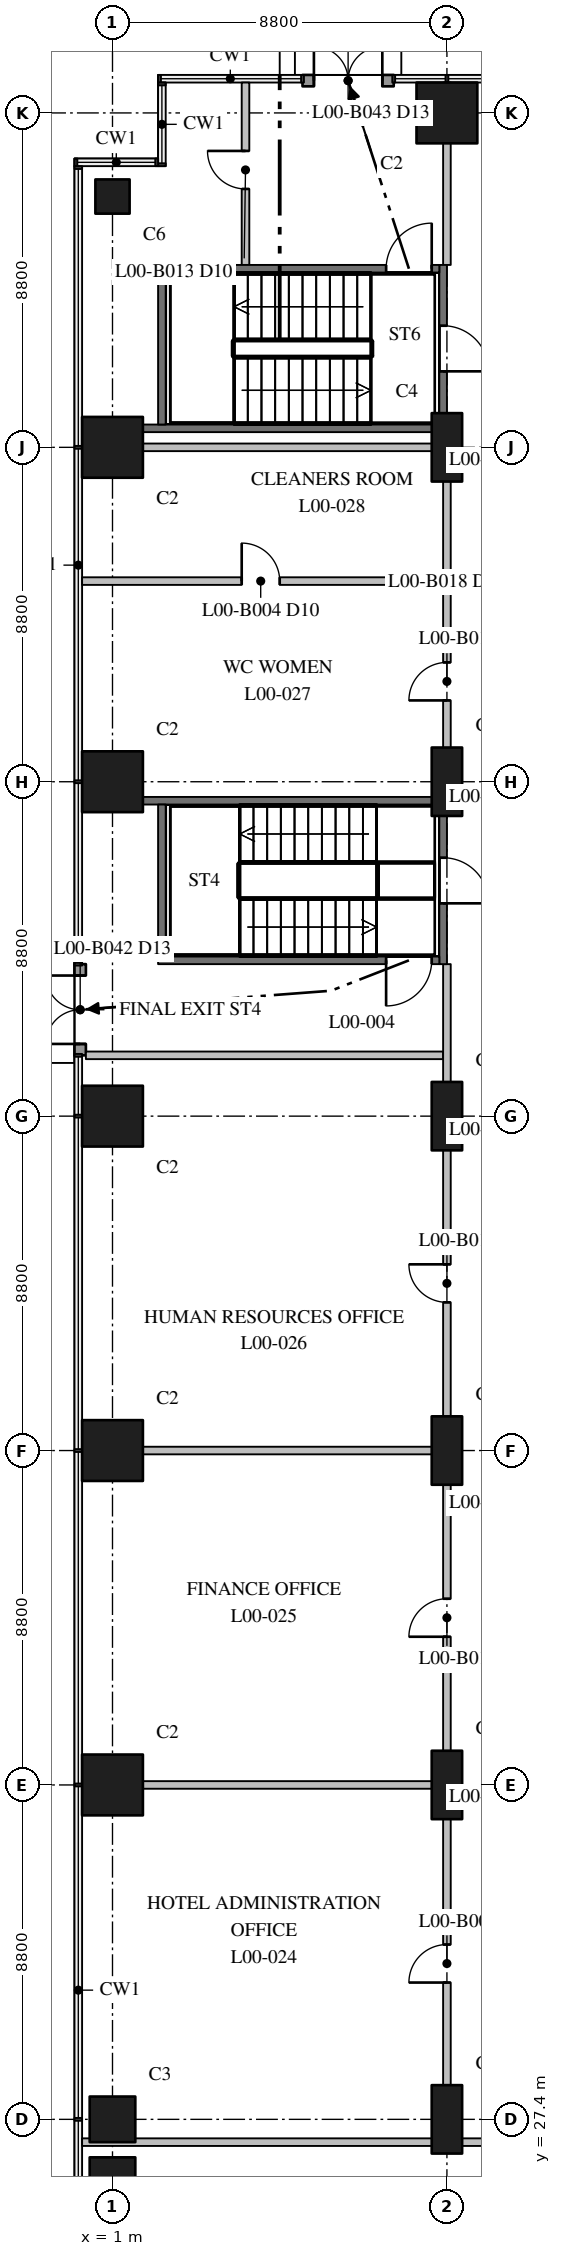
"""IFC4 building model, lengths in metres.
Left out: names, types, materials, properties, quantities, classifications, styles, units other than length and angle.
Written with IfcOpenShell. Run it as: python <this file> out.ifc"""

import sys

from ifc_helpers import new_model, si_unit, direction, frame, frame_2d, origin, origin_2d, place, context, subcontext, project, spatial, rectangle, extrude, element, fill, save


model = new_model("IFC4")
c1 = context("Model", 3, precision=1e-05, world=origin(), true_north=direction((0.0, 1.0)))
c2 = subcontext(c1, "Body", "Model", "MODEL_VIEW")
j1 = project(units=[si_unit("LENGTHUNIT", "METRE"), si_unit("PLANEANGLEUNIT", "RADIAN")], contexts=[c1])
p1 = place(None, origin())
s1 = spatial("IfcSite", under=j1, at=p1, CompositionType="ELEMENT")
p2 = place(p1, origin())
s2 = spatial("IfcBuilding", under=s1, at=p2, CompositionType="ELEMENT")
p3 = place(p2, origin())
s3 = spatial("IfcBuildingStorey", under=s2, at=p3, CompositionType="ELEMENT", Elevation=0.0)
for number, where, z_axis, x_axis in (
    (1, (1.0, 25.8, 0.0), (0.0, 0.0, 1.0), (1.0, 0.0, 0.0)),
    (2, (1.0, 27.4, 0.0), (0.0, 0.0, 1.0), (1.0, 0.0, 0.0)),
):
    element("IfcColumn", number, at=place(p3, frame(where, z_axis=z_axis, x_axis=x_axis)), inside=s3, PredefinedType="COLUMN", context=c2, shape_type="SweptSolid", body=[
        extrude(rectangle(XDim=1.2, YDim=1.2, at=origin_2d()), origin(), (0.0, 0.0, 1.0), 7.5),
    ])
for number, where, z_axis, x_axis in (
    (3, (1.0, 36.2, 0.0), (0.0, 0.0, 1.0), (1.0, 0.0, 0.0)),
    (4, (1.0, 45.0, 0.0), (0.0, 0.0, 1.0), (1.0, 0.0, 0.0)),
    (5, (1.0, 53.8, 0.0), (0.0, 0.0, 1.0), (1.0, 0.0, 0.0)),
    (6, (1.0, 62.6, 0.0), (0.0, 0.0, 1.0), (1.0, 0.0, 0.0)),
    (7, (1.0, 71.4, 0.0), (0.0, 0.0, 1.0), (1.0, 0.0, 0.0)),
):
    element("IfcColumn", number, at=place(p3, frame(where, z_axis=z_axis, x_axis=x_axis)), inside=s3, PredefinedType="COLUMN", context=c2, shape_type="SweptSolid", body=[
        extrude(rectangle(XDim=1.6, YDim=1.6, at=origin_2d()), origin(), (0.0, 0.0, 1.0), 7.5),
    ])
p4 = place(p3, frame((1.0, 78.0, 0.0), z_axis=(0.0, 0.0, 1.0), x_axis=(1.0, 0.0, 0.0)))
e8 = element("IfcColumn", 8, at=p4, inside=s3, PredefinedType="COLUMN", context=c2, shape_type="SweptSolid", body=[
    extrude(rectangle(XDim=0.9, YDim=0.9, at=origin_2d()), origin(), (0.0, 0.0, 1.0), 7.5),
])
for number, where, z_axis, x_axis in (
    (9, (9.8, 27.4, 0.0), (0.0, 0.0, 1.0), (0.0, 1.0, 0.0)),
    (10, (9.8, 36.2, 0.0), (0.0, 0.0, 1.0), (0.0, 1.0, 0.0)),
    (11, (9.8, 45.0, 0.0), (0.0, 0.0, 1.0), (0.0, 1.0, 0.0)),
    (12, (9.8, 53.8, 0.0), (0.0, 0.0, 1.0), (0.0, 1.0, 0.0)),
    (13, (9.8, 62.6, 0.0), (0.0, 0.0, 1.0), (0.0, 1.0, 0.0)),
    (14, (9.8, 71.4, 0.0), (0.0, 0.0, 1.0), (0.0, 1.0, 0.0)),
):
    element("IfcColumn", number, at=place(p3, frame(where, z_axis=z_axis, x_axis=x_axis)), inside=s3, PredefinedType="COLUMN", context=c2, shape_type="SweptSolid", body=[
        extrude(rectangle(XDim=1.8, YDim=0.8, at=origin_2d()), origin(), (0.0, 0.0, 1.0), 7.5),
    ])
p5 = place(p3, frame((9.8, 80.2, 0.0), z_axis=(0.0, 0.0, 1.0), x_axis=(1.0, 0.0, 0.0)))
e15 = element("IfcColumn", 15, at=p5, inside=s3, PredefinedType="COLUMN", context=c2, shape_type="SweptSolid", body=[
    extrude(rectangle(XDim=1.6, YDim=1.6, at=origin_2d()), origin(), (0.0, 0.0, 1.0), 7.5),
])
p6 = place(p3, frame((9.7, 57.8, 0.0), z_axis=(0.0, 0.0, 1.0), x_axis=(0.0, 1.0, 0.0)))
e16 = element("IfcWall", 16, at=p6, inside=s3, PredefinedType="SHEAR", context=c2, shape_type="SweptSolid", body=[
    extrude(rectangle(XDim=4.4, YDim=0.2, at=frame_2d((2.2, 0.0))), origin(), (0.0, 0.0, 1.0), 7.1),
])
p7 = place(p6, frame((1.6, 0.0, 0.0)))
e17 = element("IfcOpeningElement", 17, at=p7, cuts=e16, PredefinedType="OPENING", context=c2, shape_type="SweptSolid", body=[
    extrude(rectangle(XDim=1.2, YDim=2.1, at=frame_2d((0.6, 1.05))), frame((0.0, 0.11, 0.0), z_axis=(0.0, -1.0, 0.0), x_axis=(1.0, 0.0, 0.0)), (0.0, 0.0, 1.0), 0.22),
])
p8 = place(p3, frame((1.8, 62.1, 0.0), z_axis=(0.0, 0.0, 1.0), x_axis=(1.0, 0.0, 0.0)))
e18 = element("IfcWall", 18, at=p8, inside=s3, PredefinedType="SHEAR", context=c2, shape_type="SweptSolid", body=[
    extrude(rectangle(XDim=7.8, YDim=0.2, at=frame_2d((3.9, 0.0))), origin(), (0.0, 0.0, 1.0), 7.1),
])
p9 = place(p3, frame((2.2, 57.9, 0.0), z_axis=(0.0, 0.0, 1.0), x_axis=(1.0, 0.0, 0.0)))
e19 = element("IfcWall", 19, at=p9, inside=s3, PredefinedType="SHEAR", context=c2, shape_type="SweptSolid", body=[
    extrude(rectangle(XDim=7.4, YDim=0.2, at=frame_2d((3.7, 0.0))), origin(), (0.0, 0.0, 1.0), 7.1),
])
p10 = place(p9, frame((6.0, 0.0, 0.0)))
e20 = element("IfcOpeningElement", 20, at=p10, cuts=e19, PredefinedType="OPENING", context=c2, shape_type="SweptSolid", body=[
    extrude(rectangle(XDim=1.2, YDim=2.1, at=frame_2d((0.6, 1.05))), frame((0.0, 0.11, 0.0), z_axis=(0.0, -1.0, 0.0), x_axis=(1.0, 0.0, 0.0)), (0.0, 0.0, 1.0), 0.22),
])
p11 = place(p3, frame((2.3, 58.0, 0.0), z_axis=(0.0, 0.0, 1.0), x_axis=(0.0, 1.0, 0.0)))
e21 = element("IfcWall", 21, at=p11, inside=s3, PredefinedType="SHEAR", context=c2, shape_type="SweptSolid", body=[
    extrude(rectangle(XDim=4.0, YDim=0.2, at=frame_2d((2.0, 0.0))), origin(), (0.0, 0.0, 1.0), 7.1),
])
p12 = place(p3, frame((9.7, 71.8, 0.0), z_axis=(0.0, 0.0, 1.0), x_axis=(0.0, 1.0, 0.0)))
e22 = element("IfcWall", 22, at=p12, inside=s3, PredefinedType="SHEAR", context=c2, shape_type="SweptSolid", body=[
    extrude(rectangle(XDim=4.4, YDim=0.2, at=frame_2d((2.2, 0.0))), origin(), (0.0, 0.0, 1.0), 7.1),
])
p13 = place(p12, frame((1.6, 0.0, 0.0)))
e23 = element("IfcOpeningElement", 23, at=p13, cuts=e22, PredefinedType="OPENING", context=c2, shape_type="SweptSolid", body=[
    extrude(rectangle(XDim=1.2, YDim=2.1, at=frame_2d((0.6, 1.05))), frame((0.0, 0.11, 0.0), z_axis=(0.0, -1.0, 0.0), x_axis=(1.0, 0.0, 0.0)), (0.0, 0.0, 1.0), 0.22),
])
p14 = place(p3, frame((2.2, 76.1, 0.0), z_axis=(0.0, 0.0, 1.0), x_axis=(1.0, 0.0, 0.0)))
e24 = element("IfcWall", 24, at=p14, inside=s3, PredefinedType="SHEAR", context=c2, shape_type="SweptSolid", body=[
    extrude(rectangle(XDim=7.4, YDim=0.2, at=frame_2d((3.7, 0.0))), origin(), (0.0, 0.0, 1.0), 7.1),
])
p15 = place(p14, frame((6.0, 0.0, 0.0)))
e25 = element("IfcOpeningElement", 25, at=p15, cuts=e24, PredefinedType="OPENING", context=c2, shape_type="SweptSolid", body=[
    extrude(rectangle(XDim=1.2, YDim=2.1, at=frame_2d((0.6, 1.05))), frame((0.0, 0.11, 0.0), z_axis=(0.0, -1.0, 0.0), x_axis=(1.0, 0.0, 0.0)), (0.0, 0.0, 1.0), 0.22),
])
p16 = place(p3, frame((1.8, 71.9, 0.0), z_axis=(0.0, 0.0, 1.0), x_axis=(1.0, 0.0, 0.0)))
e26 = element("IfcWall", 26, at=p16, inside=s3, PredefinedType="SHEAR", context=c2, shape_type="SweptSolid", body=[
    extrude(rectangle(XDim=7.8, YDim=0.2, at=frame_2d((3.9, 0.0))), origin(), (0.0, 0.0, 1.0), 7.1),
])
p17 = place(p3, frame((2.3, 72.0, 0.0), z_axis=(0.0, 0.0, 1.0), x_axis=(0.0, 1.0, 0.0)))
e27 = element("IfcWall", 27, at=p17, inside=s3, PredefinedType="SHEAR", context=c2, shape_type="SweptSolid", body=[
    extrude(rectangle(XDim=4.0, YDim=0.2, at=frame_2d((2.0, 0.0))), origin(), (0.0, 0.0, 1.0), 7.1),
])
p18 = place(p3, frame((0.3, 55.4, 0.0), z_axis=(0.0, 0.0, 1.0), x_axis=(1.0, 0.0, 0.0)))
e28 = element("IfcWall", 28, at=p18, inside=s3, PredefinedType="PARTITIONING", context=c2, shape_type="SweptSolid", body=[
    extrude(rectangle(XDim=9.4, YDim=0.2, at=frame_2d((4.7, 0.0))), origin(), (0.0, 0.0, 1.0), 7.1),
])
p19 = place(p3, frame((0.2, 26.8, 0.0), z_axis=(0.0, 0.0, 1.0), x_axis=(1.0, 0.0, 0.0)))
e29 = element("IfcWall", 29, at=p19, inside=s3, PredefinedType="PARTITIONING", context=c2, shape_type="SweptSolid", body=[
    extrude(rectangle(XDim=9.6, YDim=0.2, at=frame_2d((4.8, 0.0))), origin(), (0.0, 0.0, 1.0), 7.1),
])
p20 = place(p3, frame((9.8, 26.8, 0.0), z_axis=(0.0, 0.0, 1.0), x_axis=(1.0, 0.0, 0.0)))
e30 = element("IfcWall", 30, at=p20, inside=s3, PredefinedType="PARTITIONING", context=c2, shape_type="SweptSolid", body=[
    extrude(rectangle(XDim=2.5, YDim=0.2, at=frame_2d((1.25, 0.0))), origin(), (0.0, 0.0, 1.0), 7.1),
])
for number, where, z_axis, x_axis in (
    (31, (0.2, 36.2, 0.0), (0.0, 0.0, 1.0), (1.0, 0.0, 0.0)),
    (32, (0.2, 45.0, 0.0), (0.0, 0.0, 1.0), (1.0, 0.0, 0.0)),
):
    element("IfcWall", number, at=place(p3, frame(where, z_axis=z_axis, x_axis=x_axis)), inside=s3, PredefinedType="PARTITIONING", context=c2, shape_type="SweptSolid", body=[
        extrude(rectangle(XDim=9.5, YDim=0.2, at=frame_2d((4.75, 0.0))), origin(), (0.0, 0.0, 1.0), 7.1),
    ])
p21 = place(p3, frame((0.2, 67.88, 0.0), z_axis=(0.0, 0.0, 1.0), x_axis=(1.0, 0.0, 0.0)))
e33 = element("IfcWall", 33, at=p21, inside=s3, PredefinedType="PARTITIONING", context=c2, shape_type="SweptSolid", body=[
    extrude(rectangle(XDim=9.5, YDim=0.2, at=frame_2d((4.75, 0.0))), origin(), (0.0, 0.0, 1.0), 7.1),
])
p22 = place(p21, frame((4.2, 0.0, 0.0)))
e34 = element("IfcOpeningElement", 34, at=p22, cuts=e33, PredefinedType="OPENING", context=c2, shape_type="SweptSolid", body=[
    extrude(rectangle(XDim=1.0, YDim=2.1, at=frame_2d((0.5, 1.05))), frame((0.0, 0.11, 0.0), z_axis=(0.0, -1.0, 0.0), x_axis=(1.0, 0.0, 0.0)), (0.0, 0.0, 1.0), 0.22),
])
p23 = place(p3, frame((0.2, 71.4, 0.0), z_axis=(0.0, 0.0, 1.0), x_axis=(1.0, 0.0, 0.0)))
e35 = element("IfcWall", 35, at=p23, inside=s3, PredefinedType="PARTITIONING", context=c2, shape_type="SweptSolid", body=[
    extrude(rectangle(XDim=9.5, YDim=0.2, at=frame_2d((4.75, 0.0))), origin(), (0.0, 0.0, 1.0), 7.1),
])
p24 = place(p3, frame((9.8, 26.9, 0.0), z_axis=(0.0, 0.0, 1.0), x_axis=(0.0, 1.0, 0.0)))
e36 = element("IfcWall", 36, at=p24, inside=s3, PredefinedType="PARTITIONING", context=c2, shape_type="SweptSolid", body=[
    extrude(rectangle(XDim=30.9, YDim=0.2, at=frame_2d((15.45, 0.0))), origin(), (0.0, 0.0, 1.0), 7.1),
])
p25 = place(p24, frame((4.1, 0.0, 0.0)))
e37 = element("IfcOpeningElement", 37, at=p25, cuts=e36, PredefinedType="OPENING", context=c2, shape_type="SweptSolid", body=[
    extrude(rectangle(XDim=1.0, YDim=2.1, at=frame_2d((0.5, 1.05))), frame((0.0, 0.11, 0.0), z_axis=(0.0, -1.0, 0.0), x_axis=(1.0, 0.0, 0.0)), (0.0, 0.0, 1.0), 0.22),
])
p26 = place(p24, frame((13.2, 0.0, 0.0)))
e38 = element("IfcOpeningElement", 38, at=p26, cuts=e36, PredefinedType="OPENING", context=c2, shape_type="SweptSolid", body=[
    extrude(rectangle(XDim=1.0, YDim=2.1, at=frame_2d((0.5, 1.05))), frame((0.0, 0.11, 0.0), z_axis=(0.0, -1.0, 0.0), x_axis=(1.0, 0.0, 0.0)), (0.0, 0.0, 1.0), 0.22),
])
p27 = place(p24, frame((22.0, 0.0, 0.0)))
e39 = element("IfcOpeningElement", 39, at=p27, cuts=e36, PredefinedType="OPENING", context=c2, shape_type="SweptSolid", body=[
    extrude(rectangle(XDim=1.0, YDim=2.1, at=frame_2d((0.5, 1.05))), frame((0.0, 0.11, 0.0), z_axis=(0.0, -1.0, 0.0), x_axis=(1.0, 0.0, 0.0)), (0.0, 0.0, 1.0), 0.22),
])
p28 = place(p3, frame((9.8, 62.6, 0.0), z_axis=(0.0, 0.0, 1.0), x_axis=(0.0, 1.0, 0.0)))
e40 = element("IfcWall", 40, at=p28, inside=s3, PredefinedType="PARTITIONING", context=c2, shape_type="SweptSolid", body=[
    extrude(rectangle(XDim=9.2, YDim=0.2, at=frame_2d((4.6, 0.0))), origin(), (0.0, 0.0, 1.0), 7.1),
])
p29 = place(p28, frame((2.14, 0.0, 0.0)))
e41 = element("IfcOpeningElement", 41, at=p29, cuts=e40, PredefinedType="OPENING", context=c2, shape_type="SweptSolid", body=[
    extrude(rectangle(XDim=1.0, YDim=2.1, at=frame_2d((0.5, 1.05))), frame((0.0, 0.11, 0.0), z_axis=(0.0, -1.0, 0.0), x_axis=(1.0, 0.0, 0.0)), (0.0, 0.0, 1.0), 0.22),
])
p30 = place(p3, frame((9.8, 76.2, 0.0), z_axis=(0.0, 0.0, 1.0), x_axis=(0.0, 1.0, 0.0)))
e42 = element("IfcWall", 42, at=p30, inside=s3, PredefinedType="PARTITIONING", context=c2, shape_type="SweptSolid", body=[
    extrude(rectangle(XDim=4.8, YDim=0.2, at=frame_2d((2.4, 0.0))), origin(), (0.0, 0.0, 1.0), 7.1),
])
p31 = place(p3, frame((4.5, 76.2, 0.0), z_axis=(0.0, 0.0, 1.0), x_axis=(0.0, 1.0, 0.0)))
e43 = element("IfcWall", 43, at=p31, inside=s3, PredefinedType="PARTITIONING", context=c2, shape_type="SweptSolid", body=[
    extrude(rectangle(XDim=4.8, YDim=0.2, at=frame_2d((2.4, 0.0))), origin(), (0.0, 0.0, 1.0), 7.1),
])
p32 = place(p31, frame((2.0, 0.0, 0.0)))
e44 = element("IfcOpeningElement", 44, at=p32, cuts=e43, PredefinedType="OPENING", context=c2, shape_type="SweptSolid", body=[
    extrude(rectangle(XDim=1.0, YDim=2.1, at=frame_2d((0.5, 1.05))), frame((0.0, 0.11, 0.0), z_axis=(0.0, -1.0, 0.0), x_axis=(1.0, 0.0, 0.0)), (0.0, 0.0, 1.0), 0.22),
])
p33 = place(p3, frame((0.15, 55.4, 0.0), z_axis=(0.0, 0.0, 1.0), x_axis=(0.0, 1.0, 0.0)))
e45 = element("IfcWall", 45, at=p33, inside=s3, PredefinedType="STANDARD", context=c2, shape_type="SweptSolid", body=[
    extrude(rectangle(XDim=2.4, YDim=0.3, at=frame_2d((1.2, 0.0))), origin(), (0.0, 0.0, 1.0), 7.1),
])
p34 = place(p33, frame((0.3, 0.0, 0.0)))
e46 = element("IfcOpeningElement", 46, at=p34, cuts=e45, PredefinedType="OPENING", context=c2, shape_type="SweptSolid", body=[
    extrude(rectangle(XDim=1.8, YDim=2.1, at=frame_2d((0.9, 1.05))), frame((0.0, 0.16, 0.0), z_axis=(0.0, -1.0, 0.0), x_axis=(1.0, 0.0, 0.0)), (0.0, 0.0, 1.0), 0.32),
])
p35 = place(p3, frame((6.0, 81.05, 0.0), z_axis=(0.0, 0.0, 1.0), x_axis=(1.0, 0.0, 0.0)))
e47 = element("IfcWall", 47, at=p35, inside=s3, PredefinedType="STANDARD", context=c2, shape_type="SweptSolid", body=[
    extrude(rectangle(XDim=2.4, YDim=0.3, at=frame_2d((1.2, 0.0))), origin(), (0.0, 0.0, 1.0), 7.1),
])
p36 = place(p35, frame((0.3, 0.0, 0.0)))
e48 = element("IfcOpeningElement", 48, at=p36, cuts=e47, PredefinedType="OPENING", context=c2, shape_type="SweptSolid", body=[
    extrude(rectangle(XDim=1.8, YDim=2.1, at=frame_2d((0.9, 1.05))), frame((0.0, 0.16, 0.0), z_axis=(0.0, -1.0, 0.0), x_axis=(1.0, 0.0, 0.0)), (0.0, 0.0, 1.0), 0.32),
])
p37 = place(p7, frame((1.2, 0.0, 0.0), z_axis=(0.0, 0.0, 1.0), x_axis=(-1.0, 0.0, 0.0)))
e49 = element("IfcDoor", 49, at=p37, inside=s3, OperationType="SINGLE_SWING_LEFT", PredefinedType="DOOR", context=c2, shape_type="SweptSolid", body=[
    extrude(rectangle(XDim=1.2, YDim=2.1, at=frame_2d((0.6, 1.05))), frame((0.0, 0.025, 0.0), z_axis=(0.0, -1.0, 0.0), x_axis=(1.0, 0.0, 0.0)), (0.0, 0.0, 1.0), 0.05),
])
fill(e17, e49)
p38 = place(p10, frame((1.2, 0.0, 0.0), z_axis=(0.0, 0.0, 1.0), x_axis=(-1.0, 0.0, 0.0)))
e50 = element("IfcDoor", 50, at=p38, inside=s3, OperationType="SINGLE_SWING_LEFT", PredefinedType="DOOR", context=c2, shape_type="SweptSolid", body=[
    extrude(rectangle(XDim=1.2, YDim=2.1, at=frame_2d((0.6, 1.05))), frame((0.0, 0.025, 0.0), z_axis=(0.0, -1.0, 0.0), x_axis=(1.0, 0.0, 0.0)), (0.0, 0.0, 1.0), 0.05),
])
fill(e20, e50)
p39 = place(p13, frame((1.2, 0.0, 0.0), z_axis=(0.0, 0.0, 1.0), x_axis=(-1.0, 0.0, 0.0)))
e51 = element("IfcDoor", 51, at=p39, inside=s3, OperationType="SINGLE_SWING_LEFT", PredefinedType="DOOR", context=c2, shape_type="SweptSolid", body=[
    extrude(rectangle(XDim=1.2, YDim=2.1, at=frame_2d((0.6, 1.05))), frame((0.0, 0.025, 0.0), z_axis=(0.0, -1.0, 0.0), x_axis=(1.0, 0.0, 0.0)), (0.0, 0.0, 1.0), 0.05),
])
fill(e23, e51)
p40 = place(p15, origin())
e52 = element("IfcDoor", 52, at=p40, inside=s3, OperationType="SINGLE_SWING_RIGHT", PredefinedType="DOOR", context=c2, shape_type="SweptSolid", body=[
    extrude(rectangle(XDim=1.2, YDim=2.1, at=frame_2d((0.6, 1.05))), frame((0.0, 0.025, 0.0), z_axis=(0.0, -1.0, 0.0), x_axis=(1.0, 0.0, 0.0)), (0.0, 0.0, 1.0), 0.05),
])
fill(e25, e52)
p41 = place(p22, origin())
e53 = element("IfcDoor", 53, at=p41, inside=s3, OperationType="SINGLE_SWING_LEFT", PredefinedType="DOOR", context=c2, shape_type="SweptSolid", body=[
    extrude(rectangle(XDim=1.0, YDim=2.1, at=frame_2d((0.5, 1.05))), frame((0.0, 0.025, 0.0), z_axis=(0.0, -1.0, 0.0), x_axis=(1.0, 0.0, 0.0)), (0.0, 0.0, 1.0), 0.05),
])
fill(e34, e53)
p42 = place(p25, origin())
e54 = element("IfcDoor", 54, at=p42, inside=s3, OperationType="SINGLE_SWING_LEFT", PredefinedType="DOOR", context=c2, shape_type="SweptSolid", body=[
    extrude(rectangle(XDim=1.0, YDim=2.1, at=frame_2d((0.5, 1.05))), frame((0.0, 0.025, 0.0), z_axis=(0.0, -1.0, 0.0), x_axis=(1.0, 0.0, 0.0)), (0.0, 0.0, 1.0), 0.05),
])
fill(e37, e54)
p43 = place(p26, origin())
e55 = element("IfcDoor", 55, at=p43, inside=s3, OperationType="SINGLE_SWING_LEFT", PredefinedType="DOOR", context=c2, shape_type="SweptSolid", body=[
    extrude(rectangle(XDim=1.0, YDim=2.1, at=frame_2d((0.5, 1.05))), frame((0.0, 0.025, 0.0), z_axis=(0.0, -1.0, 0.0), x_axis=(1.0, 0.0, 0.0)), (0.0, 0.0, 1.0), 0.05),
])
fill(e38, e55)
p44 = place(p27, origin())
e56 = element("IfcDoor", 56, at=p44, inside=s3, OperationType="SINGLE_SWING_RIGHT", PredefinedType="DOOR", context=c2, shape_type="SweptSolid", body=[
    extrude(rectangle(XDim=1.0, YDim=2.1, at=frame_2d((0.5, 1.05))), frame((0.0, 0.025, 0.0), z_axis=(0.0, -1.0, 0.0), x_axis=(1.0, 0.0, 0.0)), (0.0, 0.0, 1.0), 0.05),
])
fill(e39, e56)
p45 = place(p29, origin())
e57 = element("IfcDoor", 57, at=p45, inside=s3, OperationType="SINGLE_SWING_LEFT", PredefinedType="DOOR", context=c2, shape_type="SweptSolid", body=[
    extrude(rectangle(XDim=1.0, YDim=2.1, at=frame_2d((0.5, 1.05))), frame((0.0, 0.025, 0.0), z_axis=(0.0, -1.0, 0.0), x_axis=(1.0, 0.0, 0.0)), (0.0, 0.0, 1.0), 0.05),
])
fill(e41, e57)
p46 = place(p32, origin())
e58 = element("IfcDoor", 58, at=p46, inside=s3, OperationType="SINGLE_SWING_RIGHT", PredefinedType="DOOR", context=c2, shape_type="SweptSolid", body=[
    extrude(rectangle(XDim=1.0, YDim=2.1, at=frame_2d((0.5, 1.05))), frame((0.0, 0.025, 0.0), z_axis=(0.0, -1.0, 0.0), x_axis=(1.0, 0.0, 0.0)), (0.0, 0.0, 1.0), 0.05),
])
fill(e44, e58)
p47 = place(p34, origin())
e59 = element("IfcDoor", 59, at=p47, inside=s3, OperationType="DOUBLE_DOOR_SINGLE_SWING", PredefinedType="DOOR", context=c2, shape_type="SweptSolid", body=[
    extrude(rectangle(XDim=1.8, YDim=2.1, at=frame_2d((0.9, 1.05))), frame((0.0, 0.025, 0.0), z_axis=(0.0, -1.0, 0.0), x_axis=(1.0, 0.0, 0.0)), (0.0, 0.0, 1.0), 0.05),
])
fill(e46, e59)
p48 = place(p36, origin())
e60 = element("IfcDoor", 60, at=p48, inside=s3, OperationType="DOUBLE_DOOR_SINGLE_SWING", PredefinedType="DOOR", context=c2, shape_type="SweptSolid", body=[
    extrude(rectangle(XDim=1.8, YDim=2.1, at=frame_2d((0.9, 1.05))), frame((0.0, 0.025, 0.0), z_axis=(0.0, -1.0, 0.0), x_axis=(1.0, 0.0, 0.0)), (0.0, 0.0, 1.0), 0.05),
])
fill(e48, e60)
save(model, sys.argv[1])
